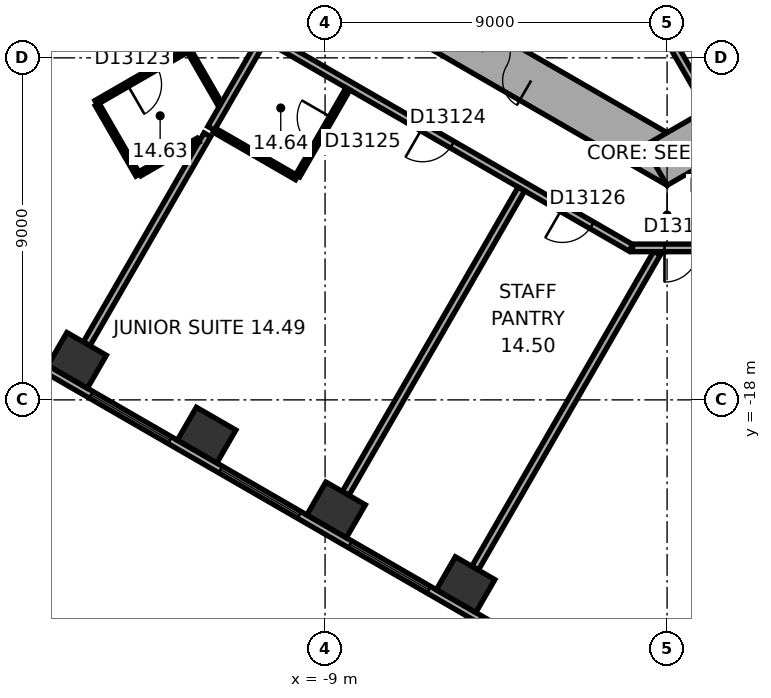
"""IFC4 building model, lengths in metres.
Left out: names, types, materials, properties, quantities, classifications, styles, units other than length and angle.
Written with IfcOpenShell. Run it as: python <this file> out.ifc"""

import sys

from ifc_helpers import new_model, si_unit, direction, frame, frame_2d, origin, origin_2d, place, context, subcontext, project, spatial, rectangle, extrude, element, fill, save


model = new_model("IFC4")
c1 = context("Model", 3, precision=1e-05, world=origin(), true_north=direction((0.0, 1.0)))
c2 = subcontext(c1, "Body", "Model", "MODEL_VIEW")
j1 = project(units=[si_unit("LENGTHUNIT", "METRE"), si_unit("PLANEANGLEUNIT", "RADIAN")], contexts=[c1])
p1 = place(None, origin())
s1 = spatial("IfcSite", under=j1, at=p1, CompositionType="ELEMENT")
p2 = place(p1, origin())
s2 = spatial("IfcBuilding", under=s1, at=p2, CompositionType="ELEMENT")
p3 = place(p2, frame((0.0, 0.0, 67.1)))
s3 = spatial("IfcBuildingStorey", under=s2, at=p3, CompositionType="ELEMENT", Elevation=67.1)
for number, where, z_axis, x_axis in (
    (1, (-15.524, -16.96, 0.0), (0.0, 0.0, 1.0), (0.866, -0.5, 0.0)),
    (2, (-12.117, -18.927, 0.0), (0.0, 0.0, 1.0), (0.866, -0.5, 0.0)),
    (3, (-8.71, -20.895, 0.0), (0.0, 0.0, 1.0), (0.866, -0.5, 0.0)),
    (4, (-5.302, -22.862, 0.0), (0.0, 0.0, 1.0), (0.866, -0.5, 0.0)),
):
    element("IfcColumn", number, at=place(p3, frame(where, z_axis=z_axis, x_axis=x_axis)), inside=s3, PredefinedType="COLUMN", context=c2, shape_type="SweptSolid", body=[
        extrude(rectangle(XDim=1.2, YDim=1.0, at=origin_2d()), origin(), (0.0, 0.0, 1.0), 3.3),
    ])
p4 = place(p3, frame((-10.4, -5.658, 0.0), z_axis=(0.0, 0.0, 1.0), x_axis=(0.866021384402, -0.500006961711, 0.0)))
e5 = element("IfcWall", 5, at=p4, inside=s3, PredefinedType="SHEAR", context=c2, shape_type="SweptSolid", body=[
    extrude(rectangle(XDim=12.355, YDim=1.2, at=frame_2d((6.178, 0.0))), origin(), (0.0, 0.0, 1.0), 3.3),
])
p5 = place(p4, frame((6.378, 0.0, 0.0)))
e6 = element("IfcOpeningElement", 6, at=p5, cuts=e5, PredefinedType="OPENING", context=c2, shape_type="SweptSolid", body=[
    extrude(rectangle(XDim=1.5, YDim=2.1, at=frame_2d((0.75, 1.05))), frame((0.0, 0.61, 0.0), z_axis=(0.0, -1.0, 0.0), x_axis=(1.0, 0.0, 0.0)), (0.0, 0.0, 1.0), 1.22),
])
p6 = place(p4, frame((3.228, 0.0, 0.0)))
e7 = element("IfcOpeningElement", 7, at=p6, cuts=e5, PredefinedType="OPENING", context=c2, shape_type="SweptSolid", body=[
    extrude(rectangle(XDim=0.9, YDim=2.1, at=frame_2d((0.45, 1.05))), frame((0.0, 0.61, 0.0), z_axis=(0.0, -1.0, 0.0), x_axis=(1.0, 0.0, 0.0)), (0.0, 0.0, 1.0), 1.22),
])
p7 = place(p3, frame((-0.3, -11.836, 0.0), z_axis=(0.0, 0.0, 1.0), x_axis=(0.866021384402, 0.500006961711, 0.0)))
e8 = element("IfcWall", 8, at=p7, inside=s3, PredefinedType="SHEAR", context=c2, shape_type="SweptSolid", body=[
    extrude(rectangle(XDim=12.355, YDim=1.2, at=frame_2d((6.178, 0.0))), origin(), (0.0, 0.0, 1.0), 3.3),
])
p8 = place(p7, frame((4.128, 0.0, 0.0)))
e9 = element("IfcOpeningElement", 9, at=p8, cuts=e8, PredefinedType="OPENING", context=c2, shape_type="SweptSolid", body=[
    extrude(rectangle(XDim=0.9, YDim=2.1, at=frame_2d((0.45, 1.05))), frame((0.0, 0.61, 0.0), z_axis=(0.0, -1.0, 0.0), x_axis=(1.0, 0.0, 0.0)), (0.0, 0.0, 1.0), 1.22),
])
p9 = place(p7, frame((7.928, 0.0, 0.0)))
e10 = element("IfcOpeningElement", 10, at=p9, cuts=e8, PredefinedType="OPENING", context=c2, shape_type="SweptSolid", body=[
    extrude(rectangle(XDim=1.1, YDim=2.1, at=frame_2d((0.55, 1.05))), frame((0.0, 0.61, 0.0), z_axis=(0.0, -1.0, 0.0), x_axis=(1.0, 0.0, 0.0)), (0.0, 0.0, 1.0), 1.22),
])
p10 = place(p3, frame((-19.914, -15.119, 0.0), z_axis=(0.0, 0.0, 1.0), x_axis=(0.866025418898, -0.499999973822, 0.0)))
e11 = element("IfcWall", 11, at=p10, inside=s3, PredefinedType="STANDARD", context=c2, shape_type="SweptSolid", body=[
    extrude(rectangle(XDim=21.246, YDim=0.2, at=frame_2d((10.623, 0.0))), origin(), (0.0, 0.0, 1.0), 3.3),
])
p11 = place(p10, frame((1.555, 0.0, 0.8)))
e12 = element("IfcOpeningElement", 12, at=p11, cuts=e11, PredefinedType="OPENING", context=c2, shape_type="SweptSolid", body=[
    extrude(rectangle(XDim=2.4, YDim=1.7, at=frame_2d((1.2, 0.85))), frame((0.0, 0.11, 0.0), z_axis=(0.0, -1.0, 0.0), x_axis=(1.0, 0.0, 0.0)), (0.0, 0.0, 1.0), 0.22),
])
p12 = place(p10, frame((5.489, 0.0, 0.8)))
e13 = element("IfcOpeningElement", 13, at=p12, cuts=e11, PredefinedType="OPENING", context=c2, shape_type="SweptSolid", body=[
    extrude(rectangle(XDim=2.4, YDim=1.7, at=frame_2d((1.2, 0.85))), frame((0.0, 0.11, 0.0), z_axis=(0.0, -1.0, 0.0), x_axis=(1.0, 0.0, 0.0)), (0.0, 0.0, 1.0), 0.22),
])
p13 = place(p10, frame((9.424, 0.0, 0.8)))
e14 = element("IfcOpeningElement", 14, at=p13, cuts=e11, PredefinedType="OPENING", context=c2, shape_type="SweptSolid", body=[
    extrude(rectangle(XDim=2.4, YDim=1.7, at=frame_2d((1.2, 0.85))), frame((0.0, 0.11, 0.0), z_axis=(0.0, -1.0, 0.0), x_axis=(1.0, 0.0, 0.0)), (0.0, 0.0, 1.0), 0.22),
])
p14 = place(p10, frame((13.358, 0.0, 0.8)))
e15 = element("IfcOpeningElement", 15, at=p14, cuts=e11, PredefinedType="OPENING", context=c2, shape_type="SweptSolid", body=[
    extrude(rectangle(XDim=2.4, YDim=1.7, at=frame_2d((1.2, 0.85))), frame((0.0, 0.11, 0.0), z_axis=(0.0, -1.0, 0.0), x_axis=(1.0, 0.0, 0.0)), (0.0, 0.0, 1.0), 0.22),
])
p15 = place(p10, frame((17.293, 0.0, 0.8)))
e16 = element("IfcOpeningElement", 16, at=p15, cuts=e11, PredefinedType="OPENING", context=c2, shape_type="SweptSolid", body=[
    extrude(rectangle(XDim=2.4, YDim=1.7, at=frame_2d((1.2, 0.85))), frame((0.0, 0.11, 0.0), z_axis=(0.0, -1.0, 0.0), x_axis=(1.0, 0.0, 0.0)), (0.0, 0.0, 1.0), 0.22),
])
p16 = place(p3, frame((0.013, -8.422, 0.0), z_axis=(0.0, 0.0, 1.0), x_axis=(0.500077893725, -0.86598042715, 0.0)))
e17 = element("IfcWall", 17, at=p16, inside=s3, PredefinedType="PARTITIONING", context=c2, shape_type="SweptSolid", body=[
    extrude(rectangle(XDim=2.2, YDim=0.2, at=frame_2d((1.1, 0.0))), origin(), (0.0, 0.0, 1.0), 3.05),
])
p17 = place(p3, frame((-15.274, -16.527, 0.0), z_axis=(0.0, 0.0, 1.0), x_axis=(0.499995225238, 0.866028160477, 0.0)))
e18 = element("IfcWall", 18, at=p17, inside=s3, PredefinedType="PARTITIONING", context=c2, shape_type="SweptSolid", body=[
    extrude(rectangle(XDim=6.353, YDim=0.2, at=frame_2d((3.177, 0.0))), origin(), (0.0, 0.0, 1.0), 3.05),
])
p18 = place(p3, frame((-15.026, -10.176, 0.0), z_axis=(0.0, 0.0, 1.0), x_axis=(0.865996816683, 0.500049511043, 0.0)))
e19 = element("IfcWall", 19, at=p18, inside=s3, PredefinedType="PARTITIONING", context=c2, shape_type="SweptSolid", body=[
    extrude(rectangle(XDim=2.8, YDim=0.12, at=frame_2d((1.4, 0.0))), origin(), (0.0, 0.0, 1.0), 3.05),
])
p19 = place(p18, frame((0.95, 0.0, 0.0)))
e20 = element("IfcOpeningElement", 20, at=p19, cuts=e19, PredefinedType="OPENING", context=c2, shape_type="SweptSolid", body=[
    extrude(rectangle(XDim=0.9, YDim=2.1, at=frame_2d((0.45, 1.05))), frame((0.0, 0.07, 0.0), z_axis=(0.0, -1.0, 0.0), x_axis=(1.0, 0.0, 0.0)), (0.0, 0.0, 1.0), 0.14),
])
p20 = place(p3, frame((-13.926, -12.081, 0.0), z_axis=(0.0, 0.0, 1.0), x_axis=(-0.499992422807, 0.866029778435, 0.0)))
e21 = element("IfcWall", 21, at=p20, inside=s3, PredefinedType="PARTITIONING", context=c2, shape_type="SweptSolid", body=[
    extrude(rectangle(XDim=2.14, YDim=0.12, at=frame_2d((1.07, 0.0))), origin(), (0.0, 0.0, 1.0), 3.05),
])
p21 = place(p3, frame((-12.571, -8.828, 0.0), z_axis=(0.0, 0.0, 1.0), x_axis=(0.499960029081, -0.866048479775, 0.0)))
e22 = element("IfcWall", 22, at=p21, inside=s3, PredefinedType="PARTITIONING", context=c2, shape_type="SweptSolid", body=[
    extrude(rectangle(XDim=1.601, YDim=0.12, at=frame_2d((0.801, 0.0))), origin(), (0.0, 0.0, 1.0), 3.05),
])
p22 = place(p3, frame((-12.342, -11.167, 0.0), z_axis=(0.0, 0.0, 1.0), x_axis=(-0.865992557167, -0.500056887695, 0.0)))
e23 = element("IfcWall", 23, at=p22, inside=s3, PredefinedType="PARTITIONING", context=c2, shape_type="SweptSolid", body=[
    extrude(rectangle(XDim=1.769, YDim=0.12, at=frame_2d((0.885, 0.0))), origin(), (0.0, 0.0, 1.0), 3.05),
])
p23 = place(p3, frame((-12.0, -10.854, 0.0), z_axis=(0.0, 0.0, 1.0), x_axis=(0.50000943426, 0.866019956843, 0.0)))
e24 = element("IfcWall", 24, at=p23, inside=s3, PredefinedType="PARTITIONING", context=c2, shape_type="SweptSolid", body=[
    extrude(rectangle(XDim=2.7, YDim=0.2, at=frame_2d((1.35, 0.0))), origin(), (0.0, 0.0, 1.0), 3.05),
])
p24 = place(p3, frame((-11.615, -7.843, 0.0), z_axis=(0.0, 0.0, 1.0), x_axis=(0.866026466995, -0.499998158461, 0.0)))
e25 = element("IfcWall", 25, at=p24, inside=s3, PredefinedType="PARTITIONING", context=c2, shape_type="SweptSolid", body=[
    extrude(rectangle(XDim=12.315, YDim=0.2, at=frame_2d((6.158, 0.0))), origin(), (0.0, 0.0, 1.0), 3.05),
])
p25 = place(p24, frame((5.983, 0.0, 0.0)))
e26 = element("IfcOpeningElement", 26, at=p25, cuts=e25, PredefinedType="OPENING", context=c2, shape_type="SweptSolid", body=[
    extrude(rectangle(XDim=0.9, YDim=2.1, at=frame_2d((0.45, 1.05))), frame((0.0, 0.11, 0.0), z_axis=(0.0, -1.0, 0.0), x_axis=(1.0, 0.0, 0.0)), (0.0, 0.0, 1.0), 0.22),
])
p26 = place(p24, frame((10.229, 0.0, 0.0)))
e27 = element("IfcOpeningElement", 27, at=p26, cuts=e25, PredefinedType="OPENING", context=c2, shape_type="SweptSolid", body=[
    extrude(rectangle(XDim=0.9, YDim=2.1, at=frame_2d((0.45, 1.05))), frame((0.0, 0.11, 0.0), z_axis=(0.0, -1.0, 0.0), x_axis=(1.0, 0.0, 0.0)), (0.0, 0.0, 1.0), 0.22),
])
p27 = place(p3, frame((-9.748, -12.155, 0.0), z_axis=(0.0, 0.0, 1.0), x_axis=(-0.866022959057, 0.500004234368, 0.0)))
e28 = element("IfcWall", 28, at=p27, inside=s3, PredefinedType="PARTITIONING", context=c2, shape_type="SweptSolid", body=[
    extrude(rectangle(XDim=2.5, YDim=0.12, at=frame_2d((1.25, 0.0))), origin(), (0.0, 0.0, 1.0), 3.05),
])
p28 = place(p3, frame((-8.46, -20.461, 0.0), z_axis=(0.0, 0.0, 1.0), x_axis=(0.499999662836, 0.866025598446, 0.0)))
e29 = element("IfcWall", 29, at=p28, inside=s3, PredefinedType="PARTITIONING", context=c2, shape_type="SweptSolid", body=[
    extrude(rectangle(XDim=9.25, YDim=0.2, at=frame_2d((4.625, 0.0))), origin(), (0.0, 0.0, 1.0), 3.05),
])
p29 = place(p3, frame((-8.398, -9.816, 0.0), z_axis=(0.0, 0.0, 1.0), x_axis=(-0.500007957085, -0.86602080971, 0.0)))
e30 = element("IfcWall", 30, at=p29, inside=s3, PredefinedType="PARTITIONING", context=c2, shape_type="SweptSolid", body=[
    extrude(rectangle(XDim=2.64, YDim=0.12, at=frame_2d((1.32, 0.0))), origin(), (0.0, 0.0, 1.0), 3.05),
])
p30 = place(p29, frame((0.87, 0.0, 0.0)))
e31 = element("IfcOpeningElement", 31, at=p30, cuts=e30, PredefinedType="OPENING", context=c2, shape_type="SweptSolid", body=[
    extrude(rectangle(XDim=0.9, YDim=2.1, at=frame_2d((0.45, 1.05))), frame((0.0, 0.07, 0.0), z_axis=(0.0, -1.0, 0.0), x_axis=(1.0, 0.0, 0.0)), (0.0, 0.0, 1.0), 0.14),
])
p31 = place(p3, frame((-5.052, -22.429, 0.0), z_axis=(0.0, 0.0, 1.0), x_axis=(0.500004329283, 0.866022904257, 0.0)))
e32 = element("IfcWall", 32, at=p31, inside=s3, PredefinedType="PARTITIONING", context=c2, shape_type="SweptSolid", body=[
    extrude(rectangle(XDim=9.572, YDim=0.2, at=frame_2d((4.786, 0.0))), origin(), (0.0, 0.0, 1.0), 3.05),
])
p32 = place(p3, frame((-0.91, -14.001, 0.0), z_axis=(0.0, 0.0, 1.0), x_axis=(1.0, 0.0, 0.0)))
e33 = element("IfcWall", 33, at=p32, inside=s3, PredefinedType="PARTITIONING", context=c2, shape_type="SweptSolid", body=[
    extrude(rectangle(XDim=1.86, YDim=0.2, at=frame_2d((0.93, 0.0))), origin(), (0.0, 0.0, 1.0), 3.05),
])
p33 = place(p32, frame((0.842, 0.0, 0.0)))
e34 = element("IfcOpeningElement", 34, at=p33, cuts=e33, PredefinedType="OPENING", context=c2, shape_type="SweptSolid", body=[
    extrude(rectangle(XDim=0.9, YDim=2.1, at=frame_2d((0.45, 1.05))), frame((0.0, 0.11, 0.0), z_axis=(0.0, -1.0, 0.0), x_axis=(1.0, 0.0, 0.0)), (0.0, 0.0, 1.0), 0.22),
])
p34 = place(p12, origin())
e35 = element("IfcWindow", 35, at=p34, inside=s3, PartitioningType="SINGLE_PANEL", PredefinedType="WINDOW", context=c2, shape_type="SweptSolid", body=[
    extrude(rectangle(XDim=2.4, YDim=1.7, at=frame_2d((1.2, 0.85))), frame((0.0, 0.03, 0.0), z_axis=(0.0, -1.0, 0.0), x_axis=(1.0, 0.0, 0.0)), (0.0, 0.0, 1.0), 0.06),
])
fill(e13, e35)
p35 = place(p13, origin())
e36 = element("IfcWindow", 36, at=p35, inside=s3, PartitioningType="SINGLE_PANEL", PredefinedType="WINDOW", context=c2, shape_type="SweptSolid", body=[
    extrude(rectangle(XDim=2.4, YDim=1.7, at=frame_2d((1.2, 0.85))), frame((0.0, 0.03, 0.0), z_axis=(0.0, -1.0, 0.0), x_axis=(1.0, 0.0, 0.0)), (0.0, 0.0, 1.0), 0.06),
])
fill(e14, e36)
p36 = place(p14, origin())
e37 = element("IfcWindow", 37, at=p36, inside=s3, PartitioningType="SINGLE_PANEL", PredefinedType="WINDOW", context=c2, shape_type="SweptSolid", body=[
    extrude(rectangle(XDim=2.4, YDim=1.7, at=frame_2d((1.2, 0.85))), frame((0.0, 0.03, 0.0), z_axis=(0.0, -1.0, 0.0), x_axis=(1.0, 0.0, 0.0)), (0.0, 0.0, 1.0), 0.06),
])
fill(e15, e37)
p37 = place(p5, origin())
e38 = element("IfcDoor", 38, at=p37, inside=s3, OperationType="DOUBLE_DOOR_SINGLE_SWING", PredefinedType="DOOR", context=c2, shape_type="SweptSolid", body=[
    extrude(rectangle(XDim=1.5, YDim=2.1, at=frame_2d((0.75, 1.05))), frame((0.0, 0.025, 0.0), z_axis=(0.0, -1.0, 0.0), x_axis=(1.0, 0.0, 0.0)), (0.0, 0.0, 1.0), 0.05),
])
fill(e6, e38)
p38 = place(p19, origin())
e39 = element("IfcDoor", 39, at=p38, inside=s3, OperationType="SINGLE_SWING_LEFT", PredefinedType="DOOR", context=c2, shape_type="SweptSolid", body=[
    extrude(rectangle(XDim=0.9, YDim=2.1, at=frame_2d((0.45, 1.05))), frame((0.0, 0.025, 0.0), z_axis=(0.0, -1.0, 0.0), x_axis=(1.0, 0.0, 0.0)), (0.0, 0.0, 1.0), 0.05),
])
fill(e20, e39)
p39 = place(p25, origin())
e40 = element("IfcDoor", 40, at=p39, inside=s3, OperationType="SINGLE_SWING_LEFT", PredefinedType="DOOR", context=c2, shape_type="SweptSolid", body=[
    extrude(rectangle(XDim=0.9, YDim=2.1, at=frame_2d((0.45, 1.05))), frame((0.0, 0.025, 0.0), z_axis=(0.0, -1.0, 0.0), x_axis=(1.0, 0.0, 0.0)), (0.0, 0.0, 1.0), 0.05),
])
fill(e26, e40)
p40 = place(p30, origin())
e41 = element("IfcDoor", 41, at=p40, inside=s3, OperationType="SINGLE_SWING_LEFT", PredefinedType="DOOR", context=c2, shape_type="SweptSolid", body=[
    extrude(rectangle(XDim=0.9, YDim=2.1, at=frame_2d((0.45, 1.05))), frame((0.0, 0.025, 0.0), z_axis=(0.0, -1.0, 0.0), x_axis=(1.0, 0.0, 0.0)), (0.0, 0.0, 1.0), 0.05),
])
fill(e31, e41)
p41 = place(p26, origin())
e42 = element("IfcDoor", 42, at=p41, inside=s3, OperationType="SINGLE_SWING_LEFT", PredefinedType="DOOR", context=c2, shape_type="SweptSolid", body=[
    extrude(rectangle(XDim=0.9, YDim=2.1, at=frame_2d((0.45, 1.05))), frame((0.0, 0.025, 0.0), z_axis=(0.0, -1.0, 0.0), x_axis=(1.0, 0.0, 0.0)), (0.0, 0.0, 1.0), 0.05),
])
fill(e27, e42)
p42 = place(p33, origin())
e43 = element("IfcDoor", 43, at=p42, inside=s3, OperationType="SINGLE_SWING_LEFT", PredefinedType="DOOR", context=c2, shape_type="SweptSolid", body=[
    extrude(rectangle(XDim=0.9, YDim=2.1, at=frame_2d((0.45, 1.05))), frame((0.0, 0.025, 0.0), z_axis=(0.0, -1.0, 0.0), x_axis=(1.0, 0.0, 0.0)), (0.0, 0.0, 1.0), 0.05),
])
fill(e34, e43)
save(model, sys.argv[1])
